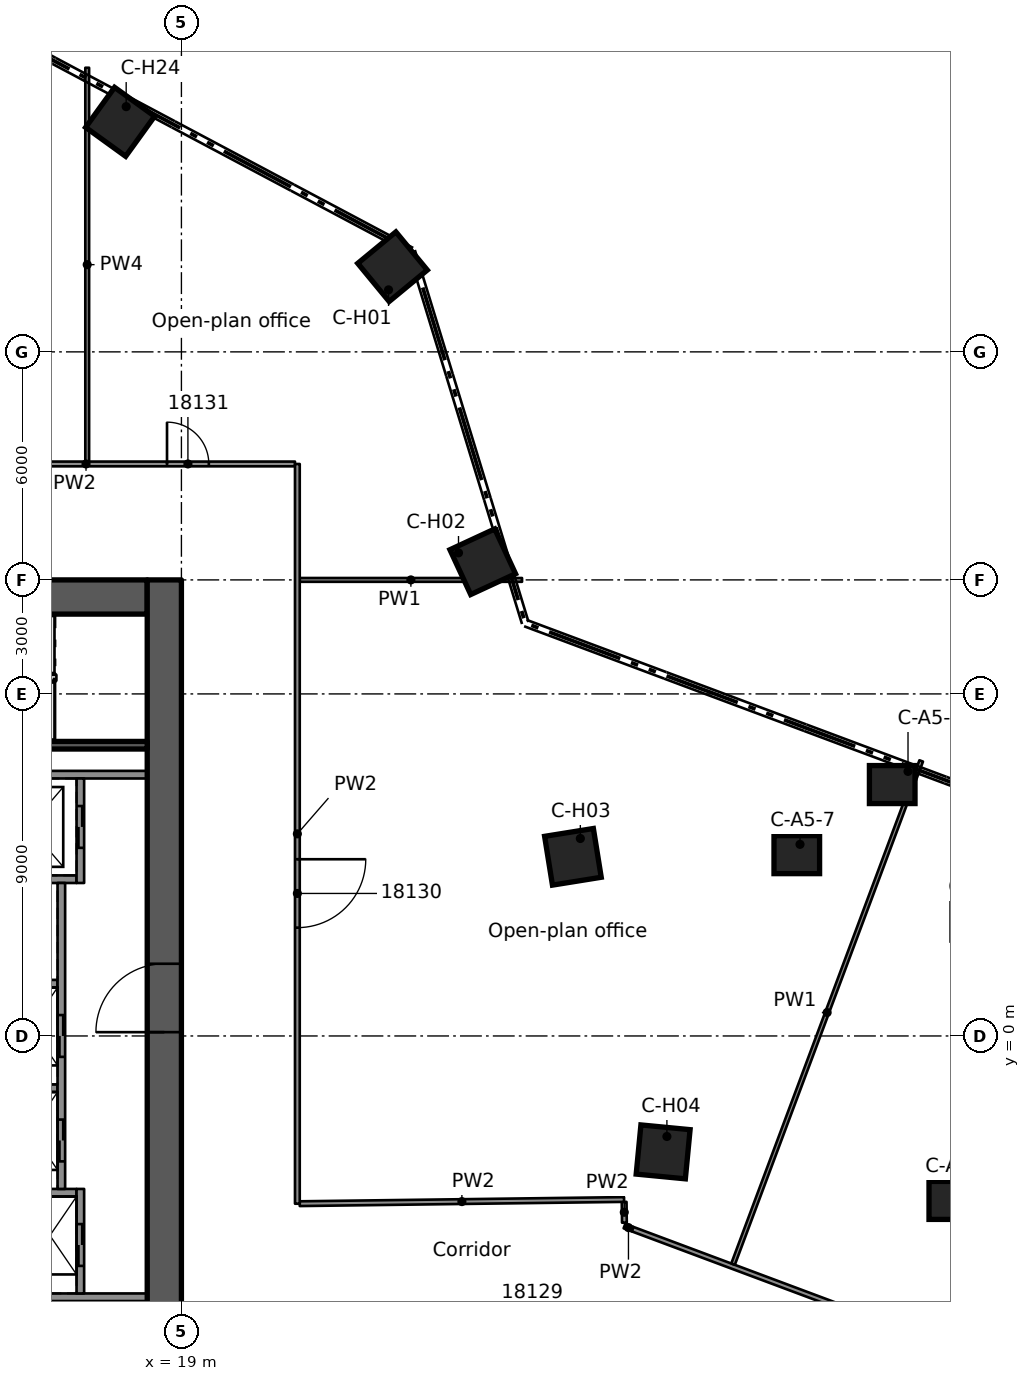
"""IFC4 building model, lengths in metres.
Left out: names, types, materials, properties, quantities, classifications, styles, units other than length and angle.
Written with IfcOpenShell. Run it as: python <this file> out.ifc"""

import sys

from ifc_helpers import new_model, si_unit, direction, frame, frame_2d, origin, origin_2d, place, context, subcontext, project, spatial, rectangle, extrude, element, fill, save


model = new_model("IFC4")
c1 = context("Model", 3, precision=1e-05, world=origin(), true_north=direction((0.0, 1.0)))
c2 = subcontext(c1, "Body", "Model", "MODEL_VIEW")
j1 = project(units=[si_unit("LENGTHUNIT", "METRE"), si_unit("PLANEANGLEUNIT", "RADIAN")], contexts=[c1])
p1 = place(None, origin())
s1 = spatial("IfcSite", under=j1, at=p1, CompositionType="ELEMENT")
p2 = place(p1, origin())
s2 = spatial("IfcBuilding", under=s1, at=p2, CompositionType="ELEMENT")
p3 = place(p2, frame((0.0, 0.0, 91.2)))
s3 = spatial("IfcBuildingStorey", under=s2, at=p3, CompositionType="ELEMENT", Elevation=91.2)
p4 = place(p3, frame((8.9, 11.55, 0.0), z_axis=(0.0, 0.0, 1.0), x_axis=(1.0, 0.0, 0.0)))
e1 = element("IfcWall", 1, at=p4, inside=s3, PredefinedType="SHEAR", context=c2, shape_type="SweptSolid", body=[
    extrude(rectangle(XDim=9.2, YDim=0.9, at=frame_2d((4.6, 0.0))), origin(), (0.0, 0.0, 1.0), 3.5),
])
p5 = place(p4, frame((3.0, 0.0, 0.0)))
e2 = element("IfcOpeningElement", 2, at=p5, cuts=e1, PredefinedType="OPENING", context=c2, shape_type="SweptSolid", body=[
    extrude(rectangle(XDim=1.1, YDim=2.1, at=frame_2d((0.55, 1.05))), frame((0.0, 0.46, 0.0), z_axis=(0.0, -1.0, 0.0), x_axis=(1.0, 0.0, 0.0)), (0.0, 0.0, 1.0), 0.92),
])
p6 = place(p4, frame((0.77, 0.0, 0.0)))
e3 = element("IfcOpeningElement", 3, at=p6, cuts=e1, PredefinedType="OPENING", context=c2, shape_type="SweptSolid", body=[
    extrude(rectangle(XDim=0.9, YDim=2.1, at=frame_2d((0.45, 1.05))), frame((0.0, 0.46, 0.0), z_axis=(0.0, -1.0, 0.0), x_axis=(1.0, 0.0, 0.0)), (0.0, 0.0, 1.0), 0.92),
])
p7 = place(p3, frame((18.55, -12.0, 0.0), z_axis=(0.0, 0.0, 1.0), x_axis=(0.0, 1.0, 0.0)))
e4 = element("IfcWall", 4, at=p7, inside=s3, PredefinedType="SHEAR", context=c2, shape_type="SweptSolid", body=[
    extrude(rectangle(XDim=24.0, YDim=0.9, at=frame_2d((12.0, 0.0))), origin(), (0.0, 0.0, 1.0), 3.5),
])
p8 = place(p7, frame((12.1, 0.0, 0.0)))
e5 = element("IfcOpeningElement", 5, at=p8, cuts=e4, PredefinedType="OPENING", context=c2, shape_type="SweptSolid", body=[
    extrude(rectangle(XDim=1.8, YDim=2.1, at=frame_2d((0.9, 1.05))), frame((0.0, 0.46, 0.0), z_axis=(0.0, -1.0, 0.0), x_axis=(1.0, 0.0, 0.0)), (0.0, 0.0, 1.0), 0.92),
])
for number, where, z_axis, x_axis in (
    (6, (39.272, -4.327, 0.0), (0.0, 0.0, 1.0), (1.0, 0.0, 0.0)),
    (7, (37.704, 6.615, 0.0), (0.0, 0.0, 1.0), (1.0, 0.0, 0.0)),
    (8, (35.193, 4.771, 0.0), (0.0, 0.0, 1.0), (1.0, 0.0, 0.0)),
):
    element("IfcColumn", number, at=place(p3, frame(where, z_axis=z_axis, x_axis=x_axis)), inside=s3, PredefinedType="COLUMN", context=c2, shape_type="SweptSolid", body=[
        extrude(rectangle(XDim=1.2, YDim=1.0, at=origin_2d()), origin(), (0.0, 0.0, 1.0), 3.5),
    ])
for number, where, z_axis, x_axis in (
    (9, (24.555, 20.241, 0.0), (0.0, 0.0, 1.0), (0.772, 0.636, 0.0)),
    (10, (26.929, 12.478, 0.0), (0.0, 0.0, 1.0), (0.907, 0.42, 0.0)),
    (11, (29.302, 4.714, 0.0), (0.0, 0.0, 1.0), (0.987, 0.159, 0.0)),
    (12, (31.676, -3.05, 0.0), (0.0, 0.0, 1.0), (0.995, -0.096, 0.0)),
    (13, (17.387, 24.053, 0.0), (0.0, 0.0, 1.0), (0.586, 0.81, 0.0)),
):
    element("IfcColumn", number, at=place(p3, frame(where, z_axis=z_axis, x_axis=x_axis)), inside=s3, PredefinedType="COLUMN", context=c2, shape_type="SweptSolid", body=[
        extrude(rectangle(XDim=1.3, YDim=1.3, at=origin_2d()), origin(), (0.0, 0.0, 1.0), 3.5),
    ])
for number, where, z_axis, x_axis in (
    (14, (11.54, -6.875, 0.0), (0.0, 0.0, 1.0), (1.0, 0.0, 0.0)),
    (15, (11.54, 6.875, 0.0), (0.0, 0.0, 1.0), (1.0, 0.0, 0.0)),
):
    element("IfcWall", number, at=place(p3, frame(where, z_axis=z_axis, x_axis=x_axis)), inside=s3, PredefinedType="SOLIDWALL", context=c2, shape_type="SweptSolid", body=[
        extrude(rectangle(XDim=6.56, YDim=0.2, at=frame_2d((3.28, 0.0))), origin(), (0.0, 0.0, 1.0), 3.09),
    ])
p9 = place(p3, frame((11.54, 4.125, 0.0), z_axis=(0.0, 0.0, 1.0), x_axis=(1.0, 0.0, 0.0)))
e16 = element("IfcWall", 16, at=p9, inside=s3, PredefinedType="SOLIDWALL", context=c2, shape_type="SweptSolid", body=[
    extrude(rectangle(XDim=4.7, YDim=0.2, at=frame_2d((2.35, 0.0))), origin(), (0.0, 0.0, 1.0), 3.09),
])
for number, where, z_axis, x_axis in (
    (17, (11.54, 1.375, 0.0), (0.0, 0.0, 1.0), (1.0, 0.0, 0.0)),
    (18, (11.54, -1.375, 0.0), (0.0, 0.0, 1.0), (1.0, 0.0, 0.0)),
):
    element("IfcWall", number, at=place(p3, frame(where, z_axis=z_axis, x_axis=x_axis)), inside=s3, PredefinedType="SOLIDWALL", context=c2, shape_type="SweptSolid", body=[
        extrude(rectangle(XDim=4.2, YDim=0.2, at=frame_2d((2.1, 0.0))), origin(), (0.0, 0.0, 1.0), 3.09),
    ])
p10 = place(p3, frame((11.54, -4.125, 0.0), z_axis=(0.0, 0.0, 1.0), x_axis=(1.0, 0.0, 0.0)))
e19 = element("IfcWall", 19, at=p10, inside=s3, PredefinedType="SOLIDWALL", context=c2, shape_type="SweptSolid", body=[
    extrude(rectangle(XDim=4.7, YDim=0.2, at=frame_2d((2.35, 0.0))), origin(), (0.0, 0.0, 1.0), 3.09),
])
p11 = place(p3, frame((16.34, 6.775, 0.0), z_axis=(0.0, 0.0, 1.0), x_axis=(0.0, -1.0, 0.0)))
e20 = element("IfcWall", 20, at=p11, inside=s3, PredefinedType="SOLIDWALL", context=c2, shape_type="SweptSolid", body=[
    extrude(rectangle(XDim=2.75, YDim=0.2, at=frame_2d((1.375, 0.0))), origin(), (0.0, 0.0, 1.0), 3.09),
])
p12 = place(p11, frame((0.725, 0.0, 0.0)))
e21 = element("IfcOpeningElement", 21, at=p12, cuts=e20, PredefinedType="OPENING", context=c2, shape_type="SweptSolid", body=[
    extrude(rectangle(XDim=1.1, YDim=2.1, at=frame_2d((0.55, 1.05))), frame((0.0, 0.11, 0.0), z_axis=(0.0, -1.0, 0.0), x_axis=(1.0, 0.0, 0.0)), (0.0, 0.0, 1.0), 0.22),
])
p13 = place(p3, frame((15.84, 4.025, 0.0), z_axis=(0.0, 0.0, 1.0), x_axis=(0.0, -1.0, 0.0)))
e22 = element("IfcWall", 22, at=p13, inside=s3, PredefinedType="SOLIDWALL", context=c2, shape_type="SweptSolid", body=[
    extrude(rectangle(XDim=8.05, YDim=0.2, at=frame_2d((4.025, 0.0))), origin(), (0.0, 0.0, 1.0), 3.09),
])
p14 = place(p13, frame((3.475, 0.0, 0.0)))
e23 = element("IfcOpeningElement", 23, at=p14, cuts=e22, PredefinedType="OPENING", context=c2, shape_type="SweptSolid", body=[
    extrude(rectangle(XDim=1.1, YDim=2.1, at=frame_2d((0.55, 1.05))), frame((0.0, 0.11, 0.0), z_axis=(0.0, -1.0, 0.0), x_axis=(1.0, 0.0, 0.0)), (0.0, 0.0, 1.0), 0.22),
])
p15 = place(p13, frame((6.225, 0.0, 0.0)))
e24 = element("IfcOpeningElement", 24, at=p15, cuts=e22, PredefinedType="OPENING", context=c2, shape_type="SweptSolid", body=[
    extrude(rectangle(XDim=1.1, YDim=2.1, at=frame_2d((0.55, 1.05))), frame((0.0, 0.11, 0.0), z_axis=(0.0, -1.0, 0.0), x_axis=(1.0, 0.0, 0.0)), (0.0, 0.0, 1.0), 0.22),
])
p16 = place(p3, frame((16.34, -4.025, 0.0), z_axis=(0.0, 0.0, 1.0), x_axis=(0.0, -1.0, 0.0)))
e25 = element("IfcWall", 25, at=p16, inside=s3, PredefinedType="SOLIDWALL", context=c2, shape_type="SweptSolid", body=[
    extrude(rectangle(XDim=2.75, YDim=0.2, at=frame_2d((1.375, 0.0))), origin(), (0.0, 0.0, 1.0), 3.09),
])
p17 = place(p16, frame((0.925, 0.0, 0.0)))
e26 = element("IfcOpeningElement", 26, at=p17, cuts=e25, PredefinedType="OPENING", context=c2, shape_type="SweptSolid", body=[
    extrude(rectangle(XDim=1.1, YDim=2.1, at=frame_2d((0.55, 1.05))), frame((0.0, 0.11, 0.0), z_axis=(0.0, -1.0, 0.0), x_axis=(1.0, 0.0, 0.0)), (0.0, 0.0, 1.0), 0.22),
])
p18 = place(p3, frame((11.54, 7.65, 0.0), z_axis=(0.0, 0.0, 1.0), x_axis=(1.0, 0.0, 0.0)))
e27 = element("IfcWall", 27, at=p18, inside=s3, PredefinedType="SOLIDWALL", context=c2, shape_type="SweptSolid", body=[
    extrude(rectangle(XDim=6.56, YDim=0.2, at=frame_2d((3.28, 0.0))), origin(), (0.0, 0.0, 1.0), 3.09),
])
p19 = place(p3, frame((30.65, -4.366, 0.0), z_axis=(0.0, 0.0, 1.0), x_axis=(0.012962701582, -0.999915980654, 0.0)))
e28 = element("IfcWall", 28, at=p19, inside=s3, PredefinedType="PARTITIONING", context=c2, shape_type="SweptSolid", body=[
    extrude(rectangle(XDim=0.546, YDim=0.125, at=frame_2d((0.273, 0.0))), origin(), (0.0, 0.0, 1.0), 3.08),
])
p20 = place(p3, frame((30.869, -5.082, 0.0), z_axis=(0.0, 0.0, 1.0), x_axis=(0.936726175225, -0.350062955264, 0.0)))
e29 = element("IfcWall", 29, at=p20, inside=s3, PredefinedType="PARTITIONING", context=c2, shape_type="SweptSolid", body=[
    extrude(rectangle(XDim=24.73, YDim=0.125, at=frame_2d((12.365, 0.0))), origin(), (0.0, 0.0, 1.0), 3.08),
])
p21 = place(p20, frame((11.706, 0.0, 0.0)))
e30 = element("IfcOpeningElement", 30, at=p21, cuts=e29, PredefinedType="OPENING", context=c2, shape_type="SweptSolid", body=[
    extrude(rectangle(XDim=1.8, YDim=2.1, at=frame_2d((0.9, 1.05))), frame((0.0, 0.073, 0.0), z_axis=(0.0, -1.0, 0.0), x_axis=(1.0, 0.0, 0.0)), (0.0, 0.0, 1.0), 0.145),
])
p22 = place(p20, frame((20.457, 0.0, 0.0)))
e31 = element("IfcOpeningElement", 31, at=p22, cuts=e29, PredefinedType="OPENING", context=c2, shape_type="SweptSolid", body=[
    extrude(rectangle(XDim=0.9, YDim=2.1, at=frame_2d((0.45, 1.05))), frame((0.0, 0.073, 0.0), z_axis=(0.0, -1.0, 0.0), x_axis=(1.0, 0.0, 0.0)), (0.0, 0.0, 1.0), 0.145),
])
p23 = place(p3, frame((30.658, -5.003, 0.0), z_axis=(0.0, 0.0, 1.0), x_axis=(0.936329177569, -0.351123441588, 0.0)))
e32 = element("IfcWall", 32, at=p23, inside=s3, PredefinedType="PARTITIONING", context=c2, shape_type="SweptSolid", body=[
    extrude(rectangle(XDim=0.225, YDim=0.125, at=frame_2d((0.113, 0.0))), origin(), (0.0, 0.0, 1.0), 3.08),
])
p24 = place(p3, frame((22.113, 12.0, 0.0), z_axis=(0.0, 0.0, 1.0), x_axis=(1.0, 0.0, 0.0)))
e33 = element("IfcWall", 33, at=p24, inside=s3, PredefinedType="PARTITIONING", context=c2, shape_type="SweptSolid", body=[
    extrude(rectangle(XDim=5.85, YDim=0.1, at=frame_2d((2.925, 0.0))), origin(), (0.0, 0.0, 1.0), 3.08),
])
p25 = place(p3, frame((10.991, 15.051, 0.0), z_axis=(0.0, 0.0, 1.0), x_axis=(1.0, 0.0, 0.0)))
e34 = element("IfcWall", 34, at=p25, inside=s3, PredefinedType="PARTITIONING", context=c2, shape_type="SweptSolid", body=[
    extrude(rectangle(XDim=10.997, YDim=0.125, at=frame_2d((5.499, 0.0))), origin(), (0.0, 0.0, 1.0), 3.08),
])
p26 = place(p25, frame((7.63, 0.0, 0.0)))
e35 = element("IfcOpeningElement", 35, at=p26, cuts=e34, PredefinedType="OPENING", context=c2, shape_type="SweptSolid", body=[
    extrude(rectangle(XDim=1.1, YDim=2.1, at=frame_2d((0.55, 1.05))), frame((0.0, 0.073, 0.0), z_axis=(0.0, -1.0, 0.0), x_axis=(1.0, 0.0, 0.0)), (0.0, 0.0, 1.0), 0.145),
])
p27 = place(p3, frame((22.113, -4.413, 0.0), z_axis=(0.0, 0.0, 1.0), x_axis=(0.999916794721, 0.012899753266, 0.0)))
e36 = element("IfcWall", 36, at=p27, inside=s3, PredefinedType="PARTITIONING", context=c2, shape_type="SweptSolid", body=[
    extrude(rectangle(XDim=8.536, YDim=0.125, at=frame_2d((4.268, 0.0))), origin(), (0.0, 0.0, 1.0), 3.08),
])
p28 = place(p3, frame((33.516, -6.004, 0.0), z_axis=(0.0, 0.0, 1.0), x_axis=(0.350228055147, 0.936664459338, 0.0)))
e37 = element("IfcWall", 37, at=p28, inside=s3, PredefinedType="PARTITIONING", context=c2, shape_type="SweptSolid", body=[
    extrude(rectangle(XDim=14.136, YDim=0.1, at=frame_2d((7.068, 0.0))), origin(), (0.0, 0.0, 1.0), 3.08),
])
p29 = place(p3, frame((22.051, 15.05, 0.0), z_axis=(0.0, 0.0, 1.0), x_axis=(0.0, -1.0, 0.0)))
e38 = element("IfcWall", 38, at=p29, inside=s3, PredefinedType="PARTITIONING", context=c2, shape_type="SweptSolid", body=[
    extrude(rectangle(XDim=19.464, YDim=0.125, at=frame_2d((9.732, 0.0))), origin(), (0.0, 0.0, 1.0), 3.08),
])
p30 = place(p29, frame((10.4, 0.0, 0.0)))
e39 = element("IfcOpeningElement", 39, at=p30, cuts=e38, PredefinedType="OPENING", context=c2, shape_type="SweptSolid", body=[
    extrude(rectangle(XDim=1.8, YDim=2.1, at=frame_2d((0.9, 1.05))), frame((0.0, 0.073, 0.0), z_axis=(0.0, -1.0, 0.0), x_axis=(1.0, 0.0, 0.0)), (0.0, 0.0, 1.0), 0.145),
])
p31 = place(p3, frame((16.521, 15.114, 0.0), z_axis=(0.0, 0.0, 1.0), x_axis=(0.0, 1.0, 0.0)))
e40 = element("IfcWall", 40, at=p31, inside=s3, PredefinedType="PARTITIONING", context=c2, shape_type="SweptSolid", body=[
    extrude(rectangle(XDim=10.362, YDim=0.1, at=frame_2d((5.181, 0.0))), origin(), (0.0, 0.0, 1.0), 2.445),
])
p32 = place(p12, origin())
e41 = element("IfcDoor", 41, at=p32, inside=s3, OperationType="DOUBLE_DOOR_SLIDING", PredefinedType="DOOR", context=c2, shape_type="SweptSolid", body=[
    extrude(rectangle(XDim=1.1, YDim=2.1, at=frame_2d((0.55, 1.05))), frame((0.0, 0.025, 0.0), z_axis=(0.0, -1.0, 0.0), x_axis=(1.0, 0.0, 0.0)), (0.0, 0.0, 1.0), 0.05),
])
fill(e21, e41)
p33 = place(p14, origin())
e42 = element("IfcDoor", 42, at=p33, inside=s3, OperationType="DOUBLE_DOOR_SLIDING", PredefinedType="DOOR", context=c2, shape_type="SweptSolid", body=[
    extrude(rectangle(XDim=1.1, YDim=2.1, at=frame_2d((0.55, 1.05))), frame((0.0, 0.025, 0.0), z_axis=(0.0, -1.0, 0.0), x_axis=(1.0, 0.0, 0.0)), (0.0, 0.0, 1.0), 0.05),
])
fill(e23, e42)
p34 = place(p15, origin())
e43 = element("IfcDoor", 43, at=p34, inside=s3, OperationType="DOUBLE_DOOR_SLIDING", PredefinedType="DOOR", context=c2, shape_type="SweptSolid", body=[
    extrude(rectangle(XDim=1.1, YDim=2.1, at=frame_2d((0.55, 1.05))), frame((0.0, 0.025, 0.0), z_axis=(0.0, -1.0, 0.0), x_axis=(1.0, 0.0, 0.0)), (0.0, 0.0, 1.0), 0.05),
])
fill(e24, e43)
p35 = place(p17, origin())
e44 = element("IfcDoor", 44, at=p35, inside=s3, OperationType="DOUBLE_DOOR_SLIDING", PredefinedType="DOOR", context=c2, shape_type="SweptSolid", body=[
    extrude(rectangle(XDim=1.1, YDim=2.1, at=frame_2d((0.55, 1.05))), frame((0.0, 0.025, 0.0), z_axis=(0.0, -1.0, 0.0), x_axis=(1.0, 0.0, 0.0)), (0.0, 0.0, 1.0), 0.05),
])
fill(e26, e44)
p36 = place(p8, origin())
e45 = element("IfcDoor", 45, at=p36, inside=s3, OperationType="SINGLE_SWING_RIGHT", PredefinedType="DOOR", context=c2, shape_type="SweptSolid", body=[
    extrude(rectangle(XDim=1.8, YDim=2.1, at=frame_2d((0.9, 1.05))), frame((0.0, 0.025, 0.0), z_axis=(0.0, -1.0, 0.0), x_axis=(1.0, 0.0, 0.0)), (0.0, 0.0, 1.0), 0.05),
])
fill(e5, e45)
p37 = place(p30, origin())
e46 = element("IfcDoor", 46, at=p37, inside=s3, OperationType="DOUBLE_DOOR_SINGLE_SWING", PredefinedType="DOOR", context=c2, shape_type="SweptSolid", body=[
    extrude(rectangle(XDim=1.8, YDim=2.1, at=frame_2d((0.9, 1.05))), frame((0.0, 0.025, 0.0), z_axis=(0.0, -1.0, 0.0), x_axis=(1.0, 0.0, 0.0)), (0.0, 0.0, 1.0), 0.05),
])
fill(e39, e46)
p38 = place(p26, origin())
e47 = element("IfcDoor", 47, at=p38, inside=s3, OperationType="SINGLE_SWING_RIGHT", PredefinedType="DOOR", context=c2, shape_type="SweptSolid", body=[
    extrude(rectangle(XDim=1.1, YDim=2.1, at=frame_2d((0.55, 1.05))), frame((0.0, 0.025, 0.0), z_axis=(0.0, -1.0, 0.0), x_axis=(1.0, 0.0, 0.0)), (0.0, 0.0, 1.0), 0.05),
])
fill(e35, e47)
save(model, sys.argv[1])
